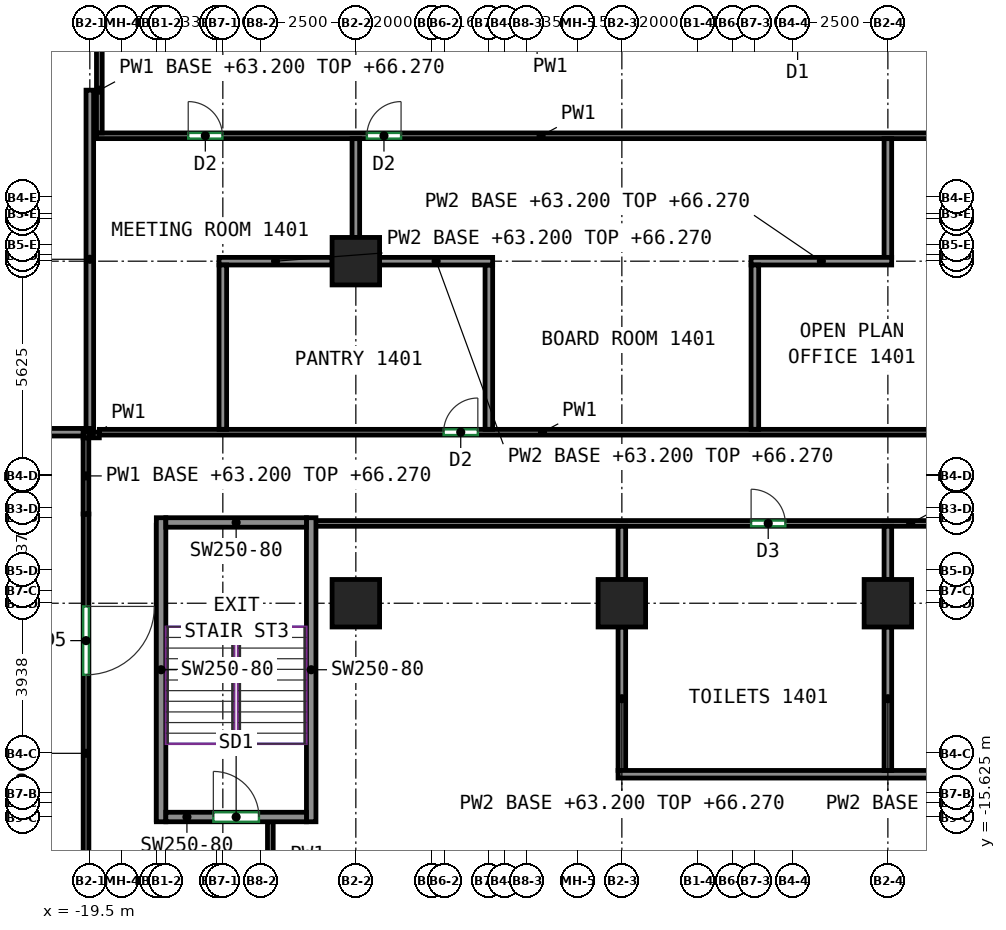
"""IFC4 building model, lengths in metres.
Left out: names, types, materials, properties, quantities, classifications, styles, units other than length and angle.
Written with IfcOpenShell. Run it as: python <this file> out.ifc"""

import sys

from ifc_helpers import new_model, si_unit, direction, frame, frame_2d, origin, origin_2d, place, context, subcontext, project, spatial, rectangle, extrude, source, transform, mapped, element, fill, save


model = new_model("IFC4")
c1 = context("Model", 3, precision=1e-05, world=origin(), true_north=direction((0.0, 1.0)))
c2 = subcontext(c1, "Body", "Model", "MODEL_VIEW")
j1 = project(units=[si_unit("LENGTHUNIT", "METRE"), si_unit("PLANEANGLEUNIT", "RADIAN")], contexts=[c1])
p1 = place(None, origin())
s1 = spatial("IfcSite", under=j1, at=p1, CompositionType="ELEMENT")
p2 = place(p1, origin())
s2 = spatial("IfcBuilding", under=s1, at=p2, CompositionType="ELEMENT")
p3 = place(p2, frame((0.0, 0.0, 63.2)))
s3 = spatial("IfcBuildingStorey", under=s2, at=p3, CompositionType="ELEMENT", Elevation=63.2)
m1 = source(origin(), c2, "Body", "SweptSolid", [
    extrude(rectangle(XDim=1.25, YDim=1.25, at=origin_2d()), origin(), (0.0, 0.0, 1.0), 3.72),
])
for number, where, z_axis, x_axis in (
    (1, (-12.5, -10.0, 0.0), (0.0, 0.0, 1.0), (1.0, 0.0, 0.0)),
    (2, (-12.5, -1.0, 0.0), (0.0, 0.0, 1.0), (1.0, 0.0, 0.0)),
    (3, (-5.5, -10.0, 0.0), (0.0, 0.0, 1.0), (1.0, 0.0, 0.0)),
    (4, (1.5, -10.0, 0.0), (0.0, 0.0, 1.0), (1.0, 0.0, 0.0)),
):
    element("IfcColumn", number, at=place(p3, frame(where, z_axis=z_axis, x_axis=x_axis)), inside=s3, PredefinedType="COLUMN", context=c2, shape_type="MappedRepresentation", body=[
        mapped(m1, transform((0.0, 0.0, 0.0))),
    ])
m2 = source(origin(), c2, "Body", "SweptSolid", [
    extrude(rectangle(XDim=8.0, YDim=0.25, at=frame_2d((4.0, 0.0))), origin(), (0.0, 0.0, 1.0), 3.72),
])
for number, where, z_axis, x_axis in (
    (5, (-17.625, -15.75, 0.0), (0.0, 0.0, 1.0), (0.0, 1.0, 0.0)),
    (6, (-13.675, -15.75, 0.0), (0.0, 0.0, 1.0), (0.0, 1.0, 0.0)),
):
    element("IfcWall", number, at=place(p3, frame(where, z_axis=z_axis, x_axis=x_axis)), inside=s3, PredefinedType="SHEAR", context=c2, shape_type="MappedRepresentation", body=[
        mapped(m2, transform((0.0, 0.0, 0.0))),
    ])
m3 = source(origin(), c2, "Body", "SweptSolid", [
    extrude(rectangle(XDim=3.7, YDim=0.25, at=frame_2d((1.85, 0.0))), origin(), (0.0, 0.0, 1.0), 3.72),
])
p4 = place(p3, frame((-17.5, -15.625, 0.0), z_axis=(0.0, 0.0, 1.0), x_axis=(1.0, 0.0, 0.0)))
e7 = element("IfcWall", 7, at=p4, inside=s3, PredefinedType="SHEAR", context=c2, shape_type="MappedRepresentation", body=[
    mapped(m3, transform((0.0, 0.0, 0.0))),
])
p5 = place(p4, frame((1.25, 0.0, 0.0)))
e8 = element("IfcOpeningElement", 8, at=p5, cuts=e7, PredefinedType="OPENING", context=c2, shape_type="SweptSolid", body=[
    extrude(rectangle(XDim=1.2, YDim=2.1, at=frame_2d((0.6, 1.05))), frame((0.0, 0.135, 0.0), z_axis=(0.0, -1.0, 0.0), x_axis=(1.0, 0.0, 0.0)), (0.0, 0.0, 1.0), 0.27),
])
p6 = place(p3, frame((-17.5, -7.875, 0.0), z_axis=(0.0, 0.0, 1.0), x_axis=(1.0, 0.0, 0.0)))
e9 = element("IfcWall", 9, at=p6, inside=s3, PredefinedType="SHEAR", context=c2, shape_type="MappedRepresentation", body=[
    mapped(m3, transform((0.0, 0.0, 0.0))),
])
p7 = place(p3, frame((-19.25, -5.573, 0.0), z_axis=(0.0, 0.0, 1.0), x_axis=(-1.0, 0.0, 0.0)))
e10 = element("IfcWall", 10, at=p7, inside=s3, PredefinedType="PARTITIONING", context=c2, shape_type="SweptSolid", body=[
    extrude(rectangle(XDim=0.427, YDim=0.15, at=frame_2d((0.213, 0.0))), origin(), (0.0, 0.0, 1.0), 3.72),
])
p8 = place(p3, frame((-13.6, -7.9, 0.0), z_axis=(0.0, 0.0, 1.0), x_axis=(1.0, 0.0, 0.0)))
e11 = element("IfcWall", 11, at=p8, inside=s3, PredefinedType="PARTITIONING", context=c2, shape_type="SweptSolid", body=[
    extrude(rectangle(XDim=31.4, YDim=0.15, at=frame_2d((15.7, 0.0))), origin(), (0.0, 0.0, 1.0), 3.72),
])
p9 = place(p8, frame((11.501, 0.0, 0.0)))
e12 = element("IfcOpeningElement", 12, at=p9, cuts=e11, PredefinedType="OPENING", context=c2, shape_type="SweptSolid", body=[
    extrude(rectangle(XDim=0.9, YDim=2.1, at=frame_2d((0.45, 1.05))), frame((0.0, 0.085, 0.0), z_axis=(0.0, -1.0, 0.0), x_axis=(1.0, 0.0, 0.0)), (0.0, 0.0, 1.0), 0.17),
])
p10 = place(p8, frame((19.003, 0.0, 0.0)))
e13 = element("IfcOpeningElement", 13, at=p10, cuts=e11, PredefinedType="OPENING", context=c2, shape_type="SweptSolid", body=[
    extrude(rectangle(XDim=0.9, YDim=2.1, at=frame_2d((0.45, 1.05))), frame((0.0, 0.085, 0.0), z_axis=(0.0, -1.0, 0.0), x_axis=(1.0, 0.0, 0.0)), (0.0, 0.0, 1.0), 0.17),
])
p11 = place(p8, frame((23.291, 0.0, 0.0)))
e14 = element("IfcOpeningElement", 14, at=p11, cuts=e11, PredefinedType="OPENING", context=c2, shape_type="SweptSolid", body=[
    extrude(rectangle(XDim=0.9, YDim=2.1, at=frame_2d((0.45, 1.05))), frame((0.0, 0.085, 0.0), z_axis=(0.0, -1.0, 0.0), x_axis=(1.0, 0.0, 0.0)), (0.0, 0.0, 1.0), 0.17),
])
p12 = place(p3, frame((-14.75, -17.475, 0.0), z_axis=(0.0, 0.0, 1.0), x_axis=(0.0, 1.0, 0.0)))
e15 = element("IfcWall", 15, at=p12, inside=s3, PredefinedType="PARTITIONING", context=c2, shape_type="SweptSolid", body=[
    extrude(rectangle(XDim=1.725, YDim=0.15, at=frame_2d((0.863, 0.0))), origin(), (0.0, 0.0, 1.0), 3.72),
])
p13 = place(p3, frame((-19.6, -7.652, 0.0), z_axis=(0.0, 0.0, 1.0), x_axis=(0.0, -1.0, 0.0)))
e16 = element("IfcWall", 16, at=p13, inside=s3, PredefinedType="PARTITIONING", context=c2, shape_type="SweptSolid", body=[
    extrude(rectangle(XDim=8.996, YDim=0.15, at=frame_2d((4.498, 0.0))), origin(), (0.0, 0.0, 1.0), 3.07),
])
p14 = place(p13, frame((2.432, 0.0, 0.0)))
e17 = element("IfcOpeningElement", 17, at=p14, cuts=e16, PredefinedType="OPENING", context=c2, shape_type="SweptSolid", body=[
    extrude(rectangle(XDim=1.8, YDim=2.1, at=frame_2d((0.9, 1.05))), frame((0.0, 0.085, 0.0), z_axis=(0.0, -1.0, 0.0), x_axis=(1.0, 0.0, 0.0)), (0.0, 0.0, 1.0), 0.17),
])
p15 = place(p3, frame((-19.602, -7.652, 0.0), z_axis=(0.0, 0.0, 1.0), x_axis=(0.0, 1.0, 0.0)))
e18 = element("IfcWall", 18, at=p15, inside=s3, PredefinedType="PARTITIONING", context=c2, shape_type="SweptSolid", body=[
    extrude(rectangle(XDim=2.004, YDim=0.15, at=frame_2d((1.002, 0.0))), origin(), (0.0, 0.0, 1.0), 3.07),
])
p16 = place(p3, frame((-19.25, -5.5, 0.0), z_axis=(0.0, 0.0, 1.0), x_axis=(1.0, 0.0, 0.0)))
e19 = element("IfcWall", 19, at=p16, inside=s3, PredefinedType="PARTITIONING", context=c2, shape_type="SweptSolid", body=[
    extrude(rectangle(XDim=23.325, YDim=0.15, at=frame_2d((11.663, 0.0))), origin(), (0.0, 0.0, 1.0), 3.72),
])
p17 = place(p16, frame((9.06, 0.0, 0.0)))
e20 = element("IfcOpeningElement", 20, at=p17, cuts=e19, PredefinedType="OPENING", context=c2, shape_type="SweptSolid", body=[
    extrude(rectangle(XDim=0.9, YDim=2.1, at=frame_2d((0.45, 1.05))), frame((0.0, 0.085, 0.0), z_axis=(0.0, -1.0, 0.0), x_axis=(1.0, 0.0, 0.0)), (0.0, 0.0, 1.0), 0.17),
])
p18 = place(p3, frame((-19.325, 2.3, 0.0), z_axis=(0.0, 0.0, 1.0), x_axis=(1.0, 0.0, 0.0)))
e21 = element("IfcWall", 21, at=p18, inside=s3, PredefinedType="PARTITIONING", context=c2, shape_type="SweptSolid", body=[
    extrude(rectangle(XDim=23.4, YDim=0.15, at=frame_2d((11.7, 0.0))), origin(), (0.0, 0.0, 1.0), 3.72),
])
p19 = place(p18, frame((2.414, 0.0, 0.0)))
e22 = element("IfcOpeningElement", 22, at=p19, cuts=e21, PredefinedType="OPENING", context=c2, shape_type="SweptSolid", body=[
    extrude(rectangle(XDim=0.9, YDim=2.1, at=frame_2d((0.45, 1.05))), frame((0.0, 0.085, 0.0), z_axis=(0.0, -1.0, 0.0), x_axis=(1.0, 0.0, 0.0)), (0.0, 0.0, 1.0), 0.17),
])
p20 = place(p18, frame((7.115, 0.0, 0.0)))
e23 = element("IfcOpeningElement", 23, at=p20, cuts=e21, PredefinedType="OPENING", context=c2, shape_type="SweptSolid", body=[
    extrude(rectangle(XDim=0.9, YDim=2.1, at=frame_2d((0.45, 1.05))), frame((0.0, 0.085, 0.0), z_axis=(0.0, -1.0, 0.0), x_axis=(1.0, 0.0, 0.0)), (0.0, 0.0, 1.0), 0.17),
])
p21 = place(p3, frame((-19.25, 2.375, 0.0), z_axis=(0.0, 0.0, 1.0), x_axis=(0.0, 1.0, 0.0)))
e24 = element("IfcWall", 24, at=p21, inside=s3, PredefinedType="PARTITIONING", context=c2, shape_type="SweptSolid", body=[
    extrude(rectangle(XDim=2.25, YDim=0.15, at=frame_2d((1.125, 0.0))), origin(), (0.0, 0.0, 1.0), 3.07),
])
p22 = place(p3, frame((-19.677, -5.5, 0.0), z_axis=(0.0, 0.0, 1.0), x_axis=(-1.0, 0.0, 0.0)))
e25 = element("IfcWall", 25, at=p22, inside=s3, PredefinedType="PARTITIONING", context=c2, shape_type="SweptSolid", body=[
    extrude(rectangle(XDim=3.073, YDim=0.2, at=frame_2d((1.537, 0.0))), origin(), (0.0, 0.0, 1.0), 3.72),
])
p23 = place(p3, frame((-5.5, -9.375, 0.0), z_axis=(0.0, 0.0, 1.0), x_axis=(0.0, 1.0, 0.0)))
e26 = element("IfcWall", 26, at=p23, inside=s3, PredefinedType="PARTITIONING", context=c2, shape_type="SweptSolid", body=[
    extrude(rectangle(XDim=1.399, YDim=0.2, at=frame_2d((0.699, 0.0))), origin(), (0.0, 0.0, 1.0), 3.72),
])
p24 = place(p3, frame((-5.5, -14.4, 0.0), z_axis=(0.0, 0.0, 1.0), x_axis=(0.0, 1.0, 0.0)))
e27 = element("IfcWall", 27, at=p24, inside=s3, PredefinedType="PARTITIONING", context=c2, shape_type="SweptSolid", body=[
    extrude(rectangle(XDim=3.775, YDim=0.2, at=frame_2d((1.887, 0.0))), origin(), (0.0, 0.0, 1.0), 3.07),
])
p25 = place(p3, frame((-5.6, -14.5, 0.0), z_axis=(0.0, 0.0, 1.0), x_axis=(1.0, 0.0, 0.0)))
e28 = element("IfcWall", 28, at=p25, inside=s3, PredefinedType="PARTITIONING", context=c2, shape_type="SweptSolid", body=[
    extrude(rectangle(XDim=17.7, YDim=0.2, at=frame_2d((8.85, 0.0))), origin(), (0.0, 0.0, 1.0), 3.72),
])
p26 = place(p3, frame((-19.5, 3.5, 0.0), z_axis=(0.0, 0.0, 1.0), x_axis=(0.0, -1.0, 0.0)))
e29 = element("IfcWall", 29, at=p26, inside=s3, PredefinedType="PARTITIONING", context=c2, shape_type="SweptSolid", body=[
    extrude(rectangle(XDim=8.9, YDim=0.2, at=frame_2d((4.45, 0.0))), origin(), (0.0, 0.0, 1.0), 3.07),
])
p27 = place(p3, frame((-16.1, -1.0, 0.0), z_axis=(0.0, 0.0, 1.0), x_axis=(1.0, 0.0, 0.0)))
e30 = element("IfcWall", 30, at=p27, inside=s3, PredefinedType="PARTITIONING", context=c2, shape_type="SweptSolid", body=[
    extrude(rectangle(XDim=2.975, YDim=0.2, at=frame_2d((1.488, 0.0))), origin(), (0.0, 0.0, 1.0), 3.07),
])
p28 = place(p3, frame((-16.0, -5.424, 0.0), z_axis=(0.0, 0.0, 1.0), x_axis=(0.0, 1.0, 0.0)))
e31 = element("IfcWall", 31, at=p28, inside=s3, PredefinedType="PARTITIONING", context=c2, shape_type="SweptSolid", body=[
    extrude(rectangle(XDim=4.324, YDim=0.2, at=frame_2d((2.162, 0.0))), origin(), (0.0, 0.0, 1.0), 3.72),
])
p29 = place(p3, frame((-12.5, -0.375, 0.0), z_axis=(0.0, 0.0, 1.0), x_axis=(0.0, 1.0, 0.0)))
e32 = element("IfcWall", 32, at=p29, inside=s3, PredefinedType="PARTITIONING", context=c2, shape_type="SweptSolid", body=[
    extrude(rectangle(XDim=2.599, YDim=0.2, at=frame_2d((1.3, 0.0))), origin(), (0.0, 0.0, 1.0), 3.72),
])
p30 = place(p3, frame((-9.0, -5.424, 0.0), z_axis=(0.0, 0.0, 1.0), x_axis=(0.0, 1.0, 0.0)))
e33 = element("IfcWall", 33, at=p30, inside=s3, PredefinedType="PARTITIONING", context=c2, shape_type="SweptSolid", body=[
    extrude(rectangle(XDim=4.324, YDim=0.2, at=frame_2d((2.162, 0.0))), origin(), (0.0, 0.0, 1.0), 3.72),
])
p31 = place(p3, frame((-11.875, -1.0, 0.0), z_axis=(0.0, 0.0, 1.0), x_axis=(1.0, 0.0, 0.0)))
e34 = element("IfcWall", 34, at=p31, inside=s3, PredefinedType="PARTITIONING", context=c2, shape_type="SweptSolid", body=[
    extrude(rectangle(XDim=2.975, YDim=0.2, at=frame_2d((1.488, 0.0))), origin(), (0.0, 0.0, 1.0), 3.07),
])
p32 = place(p3, frame((1.5, -0.9, 0.0), z_axis=(0.0, 0.0, 1.0), x_axis=(0.0, 1.0, 0.0)))
e35 = element("IfcWall", 35, at=p32, inside=s3, PredefinedType="PARTITIONING", context=c2, shape_type="SweptSolid", body=[
    extrude(rectangle(XDim=3.124, YDim=0.2, at=frame_2d((1.562, 0.0))), origin(), (0.0, 0.0, 1.0), 3.72),
])
p33 = place(p3, frame((-2.1, -1.0, 0.0), z_axis=(0.0, 0.0, 1.0), x_axis=(1.0, 0.0, 0.0)))
e36 = element("IfcWall", 36, at=p33, inside=s3, PredefinedType="PARTITIONING", context=c2, shape_type="SweptSolid", body=[
    extrude(rectangle(XDim=3.7, YDim=0.2, at=frame_2d((1.85, 0.0))), origin(), (0.0, 0.0, 1.0), 3.07),
])
p34 = place(p3, frame((-2.0, -5.424, 0.0), z_axis=(0.0, 0.0, 1.0), x_axis=(0.0, 1.0, 0.0)))
e37 = element("IfcWall", 37, at=p34, inside=s3, PredefinedType="PARTITIONING", context=c2, shape_type="SweptSolid", body=[
    extrude(rectangle(XDim=4.324, YDim=0.2, at=frame_2d((2.162, 0.0))), origin(), (0.0, 0.0, 1.0), 3.72),
])
p35 = place(p3, frame((1.5, -9.375, 0.0), z_axis=(0.0, 0.0, 1.0), x_axis=(0.0, 1.0, 0.0)))
e38 = element("IfcWall", 38, at=p35, inside=s3, PredefinedType="PARTITIONING", context=c2, shape_type="SweptSolid", body=[
    extrude(rectangle(XDim=1.399, YDim=0.2, at=frame_2d((0.699, 0.0))), origin(), (0.0, 0.0, 1.0), 3.72),
])
p36 = place(p3, frame((1.5, -14.4, 0.0), z_axis=(0.0, 0.0, 1.0), x_axis=(0.0, 1.0, 0.0)))
e39 = element("IfcWall", 39, at=p36, inside=s3, PredefinedType="PARTITIONING", context=c2, shape_type="SweptSolid", body=[
    extrude(rectangle(XDim=3.775, YDim=0.2, at=frame_2d((1.887, 0.0))), origin(), (0.0, 0.0, 1.0), 3.07),
])
p37 = place(p5, origin())
e40 = element("IfcDoor", 40, at=p37, inside=s3, OperationType="DOUBLE_DOOR_SINGLE_SWING", PredefinedType="DOOR", context=c2, shape_type="SweptSolid", body=[
    extrude(rectangle(XDim=1.2, YDim=2.1, at=frame_2d((0.6, 1.05))), frame((0.0, 0.025, 0.0), z_axis=(0.0, -1.0, 0.0), x_axis=(1.0, 0.0, 0.0)), (0.0, 0.0, 1.0), 0.05),
])
fill(e8, e40)
p38 = place(p14, origin())
e41 = element("IfcDoor", 41, at=p38, inside=s3, OperationType="DOUBLE_DOOR_SINGLE_SWING", PredefinedType="DOOR", context=c2, shape_type="SweptSolid", body=[
    extrude(rectangle(XDim=1.8, YDim=2.1, at=frame_2d((0.9, 1.05))), frame((0.0, 0.025, 0.0), z_axis=(0.0, -1.0, 0.0), x_axis=(1.0, 0.0, 0.0)), (0.0, 0.0, 1.0), 0.05),
])
fill(e17, e41)
p39 = place(p9, origin())
e42 = element("IfcDoor", 42, at=p39, inside=s3, OperationType="SINGLE_SWING_LEFT", PredefinedType="DOOR", context=c2, shape_type="SweptSolid", body=[
    extrude(rectangle(XDim=0.9, YDim=2.1, at=frame_2d((0.45, 1.05))), frame((0.0, 0.025, 0.0), z_axis=(0.0, -1.0, 0.0), x_axis=(1.0, 0.0, 0.0)), (0.0, 0.0, 1.0), 0.05),
])
fill(e12, e42)
p40 = place(p17, origin())
e43 = element("IfcDoor", 43, at=p40, inside=s3, OperationType="SINGLE_SWING_RIGHT", PredefinedType="DOOR", context=c2, shape_type="SweptSolid", body=[
    extrude(rectangle(XDim=0.9, YDim=2.1, at=frame_2d((0.45, 1.05))), frame((0.0, 0.025, 0.0), z_axis=(0.0, -1.0, 0.0), x_axis=(1.0, 0.0, 0.0)), (0.0, 0.0, 1.0), 0.05),
])
fill(e20, e43)
p41 = place(p19, origin())
e44 = element("IfcDoor", 44, at=p41, inside=s3, OperationType="SINGLE_SWING_LEFT", PredefinedType="DOOR", context=c2, shape_type="SweptSolid", body=[
    extrude(rectangle(XDim=0.9, YDim=2.1, at=frame_2d((0.45, 1.05))), frame((0.0, 0.025, 0.0), z_axis=(0.0, -1.0, 0.0), x_axis=(1.0, 0.0, 0.0)), (0.0, 0.0, 1.0), 0.05),
])
fill(e22, e44)
p42 = place(p20, origin())
e45 = element("IfcDoor", 45, at=p42, inside=s3, OperationType="SINGLE_SWING_RIGHT", PredefinedType="DOOR", context=c2, shape_type="SweptSolid", body=[
    extrude(rectangle(XDim=0.9, YDim=2.1, at=frame_2d((0.45, 1.05))), frame((0.0, 0.025, 0.0), z_axis=(0.0, -1.0, 0.0), x_axis=(1.0, 0.0, 0.0)), (0.0, 0.0, 1.0), 0.05),
])
fill(e23, e45)
save(model, sys.argv[1])
